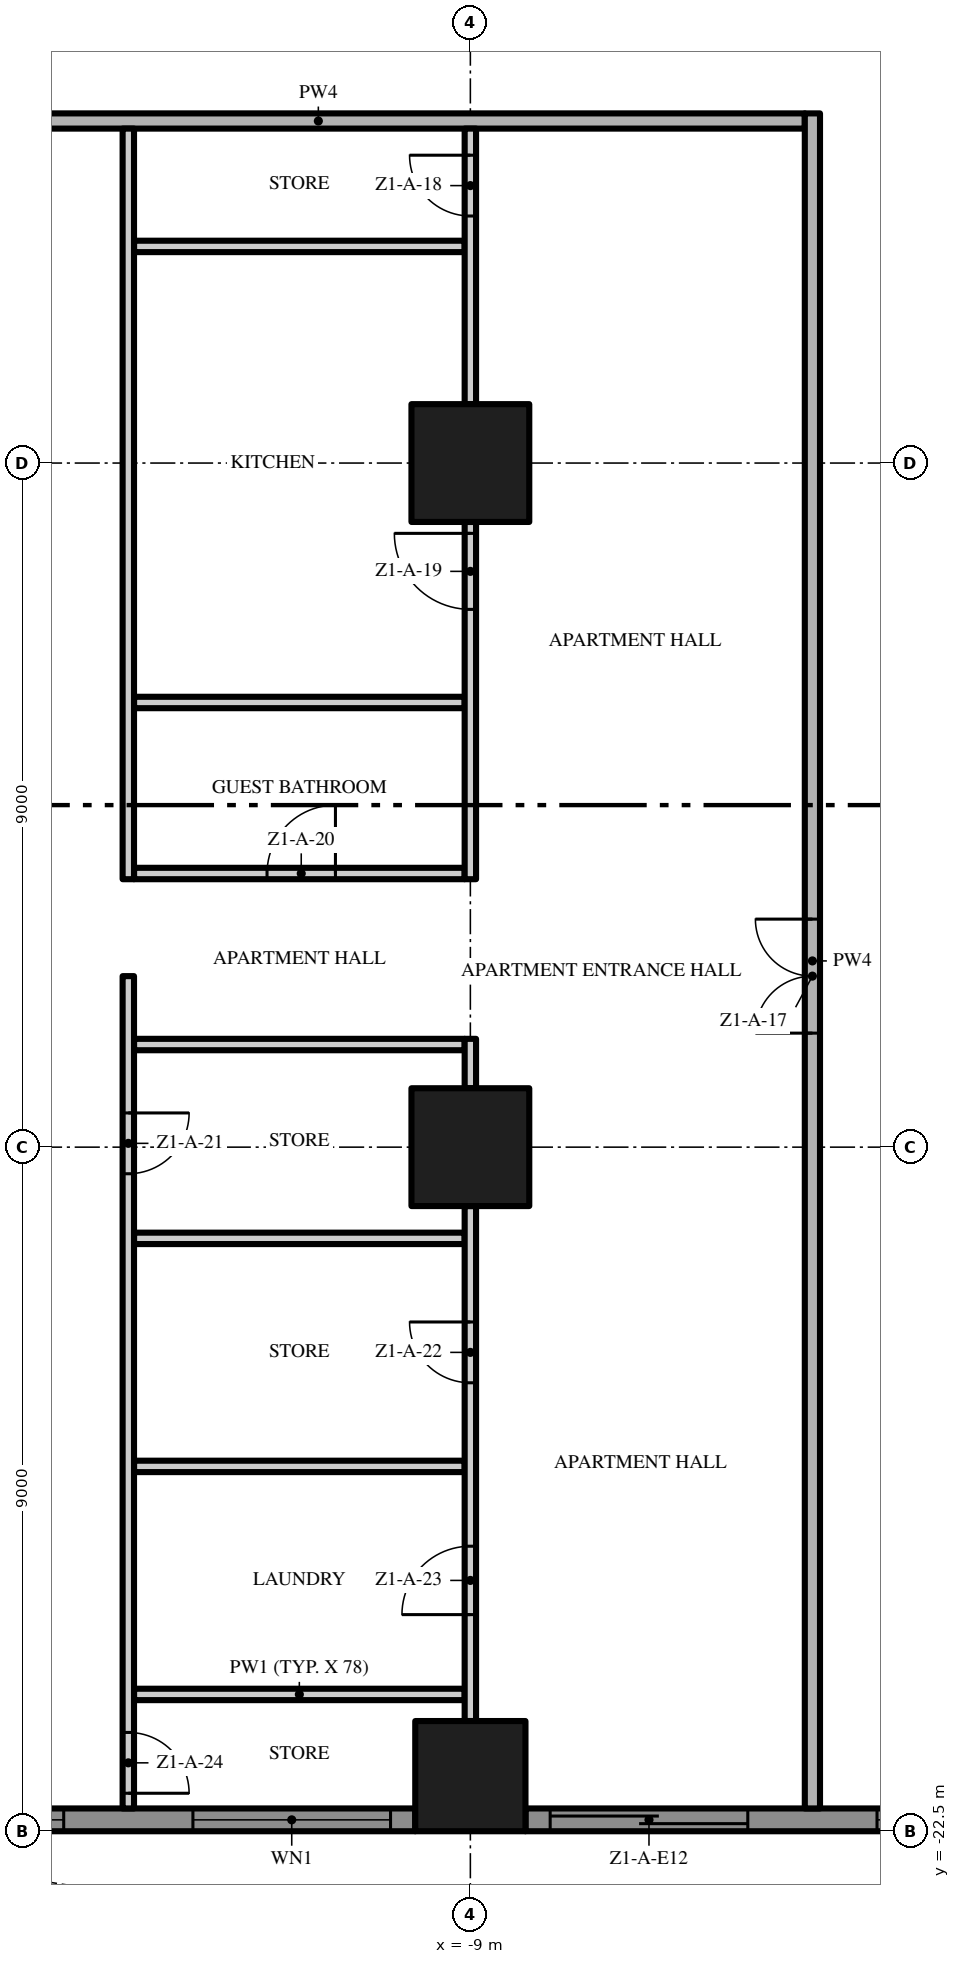
"""IFC4 building model, lengths in metres.
Left out: names, types, materials, properties, quantities, classifications, styles, units other than length and angle.
Written with IfcOpenShell. Run it as: python <this file> out.ifc"""

import sys

from ifc_helpers import new_model, si_unit, direction, frame, frame_2d, origin, origin_2d, place, context, subcontext, project, spatial, polyline, rectangle, outline, extrude, element, fill, save


model = new_model("IFC4")
c1 = context("Model", 3, precision=1e-05, world=origin(), true_north=direction((0.0, 1.0)))
c2 = subcontext(c1, "Body", "Model", "MODEL_VIEW")
j1 = project(units=[si_unit("LENGTHUNIT", "METRE"), si_unit("PLANEANGLEUNIT", "RADIAN")], contexts=[c1])
p1 = place(None, origin())
s1 = spatial("IfcSite", under=j1, at=p1, CompositionType="ELEMENT")
p2 = place(p1, origin())
s2 = spatial("IfcBuilding", under=s1, at=p2, CompositionType="ELEMENT")
p3 = place(p2, frame((0.0, 0.0, 22.6)))
s3 = spatial("IfcBuildingStorey", under=s2, at=p3, CompositionType="ELEMENT", Elevation=22.6)
p4 = place(p3, frame((-9.0, -13.5, 0.0), z_axis=(0.0, 0.0, 1.0), x_axis=(1.0, 0.0, 0.0)))
e1 = element("IfcColumn", 1, at=p4, inside=s3, PredefinedType="COLUMN", context=c2, shape_type="SweptSolid", body=[
    extrude(rectangle(XDim=1.55, YDim=1.55, at=origin_2d()), origin(), (0.0, 0.0, 1.0), 3.5),
])
p5 = place(p3, frame((-9.0, -21.775, 0.0), z_axis=(0.0, 0.0, 1.0), x_axis=(1.0, 0.0, 0.0)))
e2 = element("IfcColumn", 2, at=p5, inside=s3, PredefinedType="COLUMN", context=c2, shape_type="SweptSolid", body=[
    extrude(rectangle(XDim=1.45, YDim=1.45, at=origin_2d()), origin(), (0.0, 0.0, 1.0), 3.5),
])
p6 = place(p3, frame((-9.0, -4.5, 0.0), z_axis=(0.0, 0.0, 1.0), x_axis=(1.0, 0.0, 0.0)))
e3 = element("IfcColumn", 3, at=p6, inside=s3, PredefinedType="COLUMN", context=c2, shape_type="SweptSolid", body=[
    extrude(rectangle(XDim=1.55, YDim=1.55, at=origin_2d()), origin(), (0.0, 0.0, 1.0), 3.5),
])
p7 = place(p3, frame((-9.725, -22.35, 0.0), z_axis=(0.0, 0.0, 1.0), x_axis=(-1.0, 0.0, 0.0)))
e4 = element("IfcWall", 4, at=p7, inside=s3, PredefinedType="SOLIDWALL", context=c2, shape_type="SweptSolid", body=[
    extrude(rectangle(XDim=7.55, YDim=0.3, at=frame_2d((3.775, 0.0))), origin(), (0.0, 0.0, 1.0), 3.5),
])
p8 = place(p7, frame((4.625, 0.0, 0.45)))
e5 = element("IfcOpeningElement", 5, at=p8, cuts=e4, PredefinedType="OPENING", context=c2, shape_type="SweptSolid", body=[
    extrude(rectangle(XDim=2.6, YDim=2.65, at=frame_2d((1.3, 1.325))), frame((0.0, 0.16, 0.0), z_axis=(0.0, -1.0, 0.0), x_axis=(1.0, 0.0, 0.0)), (0.0, 0.0, 1.0), 0.32),
])
p9 = place(p7, frame((0.325, 0.0, 0.45)))
e6 = element("IfcOpeningElement", 6, at=p9, cuts=e4, PredefinedType="OPENING", context=c2, shape_type="SweptSolid", body=[
    extrude(rectangle(XDim=2.6, YDim=2.65, at=frame_2d((1.3, 1.325))), frame((0.0, 0.16, 0.0), z_axis=(0.0, -1.0, 0.0), x_axis=(1.0, 0.0, 0.0)), (0.0, 0.0, 1.0), 0.32),
])
p10 = place(p3, frame((-0.725, -22.35, 0.0), z_axis=(0.0, 0.0, 1.0), x_axis=(-1.0, 0.0, 0.0)))
e7 = element("IfcWall", 7, at=p10, inside=s3, PredefinedType="SOLIDWALL", context=c2, shape_type="SweptSolid", body=[
    extrude(rectangle(XDim=7.55, YDim=0.3, at=frame_2d((3.775, 0.0))), origin(), (0.0, 0.0, 1.0), 3.5),
])
p11 = place(p10, frame((4.625, 0.0, 0.0)))
e8 = element("IfcOpeningElement", 8, at=p11, cuts=e7, PredefinedType="OPENING", context=c2, shape_type="SweptSolid", body=[
    extrude(rectangle(XDim=2.6, YDim=2.4, at=frame_2d((1.3, 1.2))), frame((0.0, 0.16, 0.0), z_axis=(0.0, -1.0, 0.0), x_axis=(1.0, 0.0, 0.0)), (0.0, 0.0, 1.0), 0.32),
])
p12 = place(p10, frame((0.325, 0.0, 0.45)))
e9 = element("IfcOpeningElement", 9, at=p12, cuts=e7, PredefinedType="OPENING", context=c2, shape_type="SweptSolid", body=[
    extrude(rectangle(XDim=2.6, YDim=2.65, at=frame_2d((1.3, 1.325))), frame((0.0, 0.16, 0.0), z_axis=(0.0, -1.0, 0.0), x_axis=(1.0, 0.0, 0.0)), (0.0, 0.0, 1.0), 0.32),
])
p13 = place(p3, origin())
e10 = element("IfcWall", 10, at=p13, inside=s3, PredefinedType="USERDEFINED", context=c2, shape_type="SweptSolid", body=[
    extrude(outline(polyline([(-22.5, -25.5), (-21.0, -25.271), (-19.5, -24.671), (-18.0, -23.929), (-16.5, -23.329), (-15.0, -23.1), (-13.5, -23.329), (-12.0, -23.929), (-10.5, -24.671), (-9.0, -25.271), (-7.5, -25.5), (-6.0, -25.271), (-4.5, -24.671), (-3.0, -23.929), (-1.5, -23.329), (0.0, -23.1), (1.5, -23.329), (3.0, -23.929), (4.5, -24.671), (6.0, -25.271), (7.5, -25.5), (9.0, -25.271), (10.5, -24.671), (12.0, -23.929), (13.5, -23.329), (15.0, -23.1), (16.5, -23.329), (18.0, -23.929), (19.5, -24.671), (21.0, -25.271), (22.5, -25.5), (22.538, -25.253), (21.066, -25.028), (19.602, -24.442), (18.102, -23.701), (16.566, -23.086), (15.0, -22.847), (13.434, -23.086), (11.898, -23.701), (10.398, -24.442), (8.934, -25.028), (7.5, -25.247), (6.066, -25.028), (4.602, -24.442), (3.102, -23.701), (1.566, -23.086), (0.0, -22.847), (-1.566, -23.086), (-3.102, -23.701), (-4.602, -24.442), (-6.066, -25.028), (-7.5, -25.247), (-8.934, -25.028), (-10.398, -24.442), (-11.898, -23.701), (-13.434, -23.086), (-15.0, -22.847), (-16.566, -23.086), (-18.102, -23.701), (-19.602, -24.442), (-21.066, -25.028), (-22.538, -25.253), (-22.5, -25.5)])), origin(), (0.0, 0.0, 1.0), 0.9),
])
for number, where, z_axis, x_axis in (
    (11, (-13.425, -20.7, 0.0), (0.0, 0.0, 1.0), (1.0, 0.0, 0.0)),
    (12, (-13.425, -17.7, 0.0), (0.0, 0.0, 1.0), (1.0, 0.0, 0.0)),
    (13, (-13.425, -14.7, 0.0), (0.0, 0.0, 1.0), (1.0, 0.0, 0.0)),
    (14, (-13.425, -12.15, 0.0), (0.0, 0.0, 1.0), (1.0, 0.0, 0.0)),
):
    element("IfcWall", number, at=place(p3, frame(where, z_axis=z_axis, x_axis=x_axis)), inside=s3, PredefinedType="PARTITIONING", context=c2, shape_type="SweptSolid", body=[
        extrude(rectangle(XDim=4.35, YDim=0.15, at=frame_2d((2.175, 0.0))), origin(), (0.0, 0.0, 1.0), 3.5),
    ])
p14 = place(p3, frame((-13.425, -9.9, 0.0), z_axis=(0.0, 0.0, 1.0), x_axis=(1.0, 0.0, 0.0)))
e15 = element("IfcWall", 15, at=p14, inside=s3, PredefinedType="PARTITIONING", context=c2, shape_type="SweptSolid", body=[
    extrude(rectangle(XDim=4.35, YDim=0.15, at=frame_2d((2.175, 0.0))), origin(), (0.0, 0.0, 1.0), 3.5),
])
p15 = place(p14, frame((1.75, 0.0, 0.0)))
e16 = element("IfcOpeningElement", 16, at=p15, cuts=e15, PredefinedType="OPENING", context=c2, shape_type="SweptSolid", body=[
    extrude(rectangle(XDim=0.9, YDim=2.1, at=frame_2d((0.45, 1.05))), frame((0.0, 0.085, 0.0), z_axis=(0.0, -1.0, 0.0), x_axis=(1.0, 0.0, 0.0)), (0.0, 0.0, 1.0), 0.17),
])
for number, where, z_axis, x_axis in (
    (17, (-13.425, -7.65, 0.0), (0.0, 0.0, 1.0), (1.0, 0.0, 0.0)),
    (18, (-13.425, -1.65, 0.0), (0.0, 0.0, 1.0), (1.0, 0.0, 0.0)),
):
    element("IfcWall", number, at=place(p3, frame(where, z_axis=z_axis, x_axis=x_axis)), inside=s3, PredefinedType="PARTITIONING", context=c2, shape_type="SweptSolid", body=[
        extrude(rectangle(XDim=4.35, YDim=0.15, at=frame_2d((2.175, 0.0))), origin(), (0.0, 0.0, 1.0), 3.5),
    ])
p16 = place(p3, frame((-17.4, 0.0, 0.0), z_axis=(0.0, 0.0, 1.0), x_axis=(1.0, 0.0, 0.0)))
e19 = element("IfcWall", 19, at=p16, inside=s3, PredefinedType="PARTITIONING", context=c2, shape_type="SweptSolid", body=[
    extrude(rectangle(XDim=12.8, YDim=0.2, at=frame_2d((6.4, 0.0))), origin(), (0.0, 0.0, 1.0), 3.5),
])
p17 = place(p3, frame((-13.5, -11.25, 0.0), z_axis=(0.0, 0.0, 1.0), x_axis=(0.0, -1.0, 0.0)))
e20 = element("IfcWall", 20, at=p17, inside=s3, PredefinedType="PARTITIONING", context=c2, shape_type="SweptSolid", body=[
    extrude(rectangle(XDim=10.95, YDim=0.15, at=frame_2d((5.475, 0.0))), origin(), (0.0, 0.0, 1.0), 3.5),
])
p18 = place(p17, frame((1.8, 0.0, 0.0)))
e21 = element("IfcOpeningElement", 21, at=p18, cuts=e20, PredefinedType="OPENING", context=c2, shape_type="SweptSolid", body=[
    extrude(rectangle(XDim=0.8, YDim=2.0, at=frame_2d((0.4, 1.0))), frame((0.0, 0.085, 0.0), z_axis=(0.0, -1.0, 0.0), x_axis=(1.0, 0.0, 0.0)), (0.0, 0.0, 1.0), 0.17),
])
p19 = place(p17, frame((9.95, 0.0, 0.0)))
e22 = element("IfcOpeningElement", 22, at=p19, cuts=e20, PredefinedType="OPENING", context=c2, shape_type="SweptSolid", body=[
    extrude(rectangle(XDim=0.8, YDim=2.0, at=frame_2d((0.4, 1.0))), frame((0.0, 0.085, 0.0), z_axis=(0.0, -1.0, 0.0), x_axis=(1.0, 0.0, 0.0)), (0.0, 0.0, 1.0), 0.17),
])
p20 = place(p3, frame((-13.5, -9.975, 0.0), z_axis=(0.0, 0.0, 1.0), x_axis=(0.0, 1.0, 0.0)))
e23 = element("IfcWall", 23, at=p20, inside=s3, PredefinedType="PARTITIONING", context=c2, shape_type="SweptSolid", body=[
    extrude(rectangle(XDim=9.875, YDim=0.15, at=frame_2d((4.938, 0.0))), origin(), (0.0, 0.0, 1.0), 3.5),
])
p21 = place(p3, frame((-9.0, -21.05, 0.0), z_axis=(0.0, 0.0, 1.0), x_axis=(0.0, 1.0, 0.0)))
e24 = element("IfcWall", 24, at=p21, inside=s3, PredefinedType="PARTITIONING", context=c2, shape_type="SweptSolid", body=[
    extrude(rectangle(XDim=6.775, YDim=0.15, at=frame_2d((3.388, 0.0))), origin(), (0.0, 0.0, 1.0), 3.5),
])
p22 = place(p21, frame((4.45, 0.0, 0.0)))
e25 = element("IfcOpeningElement", 25, at=p22, cuts=e24, PredefinedType="OPENING", context=c2, shape_type="SweptSolid", body=[
    extrude(rectangle(XDim=0.8, YDim=2.0, at=frame_2d((0.4, 1.0))), frame((0.0, 0.085, 0.0), z_axis=(0.0, -1.0, 0.0), x_axis=(1.0, 0.0, 0.0)), (0.0, 0.0, 1.0), 0.17),
])
p23 = place(p21, frame((1.4, 0.0, 0.0)))
e26 = element("IfcOpeningElement", 26, at=p23, cuts=e24, PredefinedType="OPENING", context=c2, shape_type="SweptSolid", body=[
    extrude(rectangle(XDim=0.9, YDim=2.1, at=frame_2d((0.45, 1.05))), frame((0.0, 0.085, 0.0), z_axis=(0.0, -1.0, 0.0), x_axis=(1.0, 0.0, 0.0)), (0.0, 0.0, 1.0), 0.17),
])
p24 = place(p3, frame((-9.0, -12.725, 0.0), z_axis=(0.0, 0.0, 1.0), x_axis=(0.0, 1.0, 0.0)))
e27 = element("IfcWall", 27, at=p24, inside=s3, PredefinedType="PARTITIONING", context=c2, shape_type="SweptSolid", body=[
    extrude(rectangle(XDim=0.65, YDim=0.15, at=frame_2d((0.325, 0.0))), origin(), (0.0, 0.0, 1.0), 3.5),
])
p25 = place(p3, frame((-9.0, -9.975, 0.0), z_axis=(0.0, 0.0, 1.0), x_axis=(0.0, 1.0, 0.0)))
e28 = element("IfcWall", 28, at=p25, inside=s3, PredefinedType="PARTITIONING", context=c2, shape_type="SweptSolid", body=[
    extrude(rectangle(XDim=4.7, YDim=0.15, at=frame_2d((2.35, 0.0))), origin(), (0.0, 0.0, 1.0), 3.5),
])
p26 = place(p25, frame((3.55, 0.0, 0.0)))
e29 = element("IfcOpeningElement", 29, at=p26, cuts=e28, PredefinedType="OPENING", context=c2, shape_type="SweptSolid", body=[
    extrude(rectangle(XDim=1.0, YDim=2.4, at=frame_2d((0.5, 1.2))), frame((0.0, 0.085, 0.0), z_axis=(0.0, -1.0, 0.0), x_axis=(1.0, 0.0, 0.0)), (0.0, 0.0, 1.0), 0.17),
])
p27 = place(p3, frame((-9.0, -3.725, 0.0), z_axis=(0.0, 0.0, 1.0), x_axis=(0.0, 1.0, 0.0)))
e30 = element("IfcWall", 30, at=p27, inside=s3, PredefinedType="PARTITIONING", context=c2, shape_type="SweptSolid", body=[
    extrude(rectangle(XDim=3.625, YDim=0.15, at=frame_2d((1.812, 0.0))), origin(), (0.0, 0.0, 1.0), 3.5),
])
p28 = place(p27, frame((2.475, 0.0, 0.0)))
e31 = element("IfcOpeningElement", 31, at=p28, cuts=e30, PredefinedType="OPENING", context=c2, shape_type="SweptSolid", body=[
    extrude(rectangle(XDim=0.8, YDim=2.0, at=frame_2d((0.4, 1.0))), frame((0.0, 0.085, 0.0), z_axis=(0.0, -1.0, 0.0), x_axis=(1.0, 0.0, 0.0)), (0.0, 0.0, 1.0), 0.17),
])
p29 = place(p3, frame((-4.5, -22.2, 0.0), z_axis=(0.0, 0.0, 1.0), x_axis=(0.0, 1.0, 0.0)))
e32 = element("IfcWall", 32, at=p29, inside=s3, PredefinedType="PARTITIONING", context=c2, shape_type="SweptSolid", body=[
    extrude(rectangle(XDim=22.3, YDim=0.2, at=frame_2d((11.15, 0.0))), origin(), (0.0, 0.0, 1.0), 3.5),
])
p30 = place(p29, frame((10.2, 0.0, 0.0)))
e33 = element("IfcOpeningElement", 33, at=p30, cuts=e32, PredefinedType="OPENING", context=c2, shape_type="SweptSolid", body=[
    extrude(rectangle(XDim=1.5, YDim=2.4, at=frame_2d((0.75, 1.2))), frame((0.0, 0.11, 0.0), z_axis=(0.0, -1.0, 0.0), x_axis=(1.0, 0.0, 0.0)), (0.0, 0.0, 1.0), 0.22),
])
p31 = place(p8, origin())
e34 = element("IfcWindow", 34, at=p31, inside=s3, PartitioningType="SINGLE_PANEL", PredefinedType="WINDOW", context=c2, shape_type="SweptSolid", body=[
    extrude(rectangle(XDim=2.6, YDim=2.65, at=frame_2d((1.3, 1.325))), frame((0.0, 0.03, 0.0), z_axis=(0.0, -1.0, 0.0), x_axis=(1.0, 0.0, 0.0)), (0.0, 0.0, 1.0), 0.06),
])
fill(e5, e34)
p32 = place(p9, origin())
e35 = element("IfcWindow", 35, at=p32, inside=s3, PartitioningType="SINGLE_PANEL", PredefinedType="WINDOW", context=c2, shape_type="SweptSolid", body=[
    extrude(rectangle(XDim=2.6, YDim=2.65, at=frame_2d((1.3, 1.325))), frame((0.0, 0.03, 0.0), z_axis=(0.0, -1.0, 0.0), x_axis=(1.0, 0.0, 0.0)), (0.0, 0.0, 1.0), 0.06),
])
fill(e6, e35)
p33 = place(p11, origin())
e36 = element("IfcDoor", 36, at=p33, inside=s3, OperationType="SINGLE_SWING_LEFT", PredefinedType="DOOR", context=c2, shape_type="SweptSolid", body=[
    extrude(rectangle(XDim=2.6, YDim=2.4, at=frame_2d((1.3, 1.2))), frame((0.0, 0.025, 0.0), z_axis=(0.0, -1.0, 0.0), x_axis=(1.0, 0.0, 0.0)), (0.0, 0.0, 1.0), 0.05),
])
fill(e8, e36)
p34 = place(p12, origin())
e37 = element("IfcWindow", 37, at=p34, inside=s3, PartitioningType="SINGLE_PANEL", PredefinedType="WINDOW", context=c2, shape_type="SweptSolid", body=[
    extrude(rectangle(XDim=2.6, YDim=2.65, at=frame_2d((1.3, 1.325))), frame((0.0, 0.03, 0.0), z_axis=(0.0, -1.0, 0.0), x_axis=(1.0, 0.0, 0.0)), (0.0, 0.0, 1.0), 0.06),
])
fill(e9, e37)
p35 = place(p30, origin())
e38 = element("IfcDoor", 38, at=p35, inside=s3, OperationType="DOUBLE_DOOR_SINGLE_SWING", PredefinedType="DOOR", context=c2, shape_type="SweptSolid", body=[
    extrude(rectangle(XDim=1.5, YDim=2.4, at=frame_2d((0.75, 1.2))), frame((0.0, 0.025, 0.0), z_axis=(0.0, -1.0, 0.0), x_axis=(1.0, 0.0, 0.0)), (0.0, 0.0, 1.0), 0.05),
])
fill(e33, e38)
p36 = place(p28, origin())
e39 = element("IfcDoor", 39, at=p36, inside=s3, OperationType="SINGLE_SWING_RIGHT", PredefinedType="DOOR", context=c2, shape_type="SweptSolid", body=[
    extrude(rectangle(XDim=0.8, YDim=2.0, at=frame_2d((0.4, 1.0))), frame((0.0, 0.025, 0.0), z_axis=(0.0, -1.0, 0.0), x_axis=(1.0, 0.0, 0.0)), (0.0, 0.0, 1.0), 0.05),
])
fill(e31, e39)
p37 = place(p26, origin())
e40 = element("IfcDoor", 40, at=p37, inside=s3, OperationType="SINGLE_SWING_RIGHT", PredefinedType="DOOR", context=c2, shape_type="SweptSolid", body=[
    extrude(rectangle(XDim=1.0, YDim=2.4, at=frame_2d((0.5, 1.2))), frame((0.0, 0.025, 0.0), z_axis=(0.0, -1.0, 0.0), x_axis=(1.0, 0.0, 0.0)), (0.0, 0.0, 1.0), 0.05),
])
fill(e29, e40)
p38 = place(p15, origin())
e41 = element("IfcDoor", 41, at=p38, inside=s3, OperationType="SINGLE_SWING_RIGHT", PredefinedType="DOOR", context=c2, shape_type="SweptSolid", body=[
    extrude(rectangle(XDim=0.9, YDim=2.1, at=frame_2d((0.45, 1.05))), frame((0.0, 0.025, 0.0), z_axis=(0.0, -1.0, 0.0), x_axis=(1.0, 0.0, 0.0)), (0.0, 0.0, 1.0), 0.05),
])
fill(e16, e41)
p39 = place(p18, origin())
e42 = element("IfcDoor", 42, at=p39, inside=s3, OperationType="SINGLE_SWING_LEFT", PredefinedType="DOOR", context=c2, shape_type="SweptSolid", body=[
    extrude(rectangle(XDim=0.8, YDim=2.0, at=frame_2d((0.4, 1.0))), frame((0.0, 0.025, 0.0), z_axis=(0.0, -1.0, 0.0), x_axis=(1.0, 0.0, 0.0)), (0.0, 0.0, 1.0), 0.05),
])
fill(e21, e42)
p40 = place(p22, origin())
e43 = element("IfcDoor", 43, at=p40, inside=s3, OperationType="SINGLE_SWING_RIGHT", PredefinedType="DOOR", context=c2, shape_type="SweptSolid", body=[
    extrude(rectangle(XDim=0.8, YDim=2.0, at=frame_2d((0.4, 1.0))), frame((0.0, 0.025, 0.0), z_axis=(0.0, -1.0, 0.0), x_axis=(1.0, 0.0, 0.0)), (0.0, 0.0, 1.0), 0.05),
])
fill(e25, e43)
p41 = place(p23, origin())
e44 = element("IfcDoor", 44, at=p41, inside=s3, OperationType="SINGLE_SWING_LEFT", PredefinedType="DOOR", context=c2, shape_type="SweptSolid", body=[
    extrude(rectangle(XDim=0.9, YDim=2.1, at=frame_2d((0.45, 1.05))), frame((0.0, 0.025, 0.0), z_axis=(0.0, -1.0, 0.0), x_axis=(1.0, 0.0, 0.0)), (0.0, 0.0, 1.0), 0.05),
])
fill(e26, e44)
p42 = place(p19, origin())
e45 = element("IfcDoor", 45, at=p42, inside=s3, OperationType="SINGLE_SWING_RIGHT", PredefinedType="DOOR", context=c2, shape_type="SweptSolid", body=[
    extrude(rectangle(XDim=0.8, YDim=2.0, at=frame_2d((0.4, 1.0))), frame((0.0, 0.025, 0.0), z_axis=(0.0, -1.0, 0.0), x_axis=(1.0, 0.0, 0.0)), (0.0, 0.0, 1.0), 0.05),
])
fill(e22, e45)
save(model, sys.argv[1])
